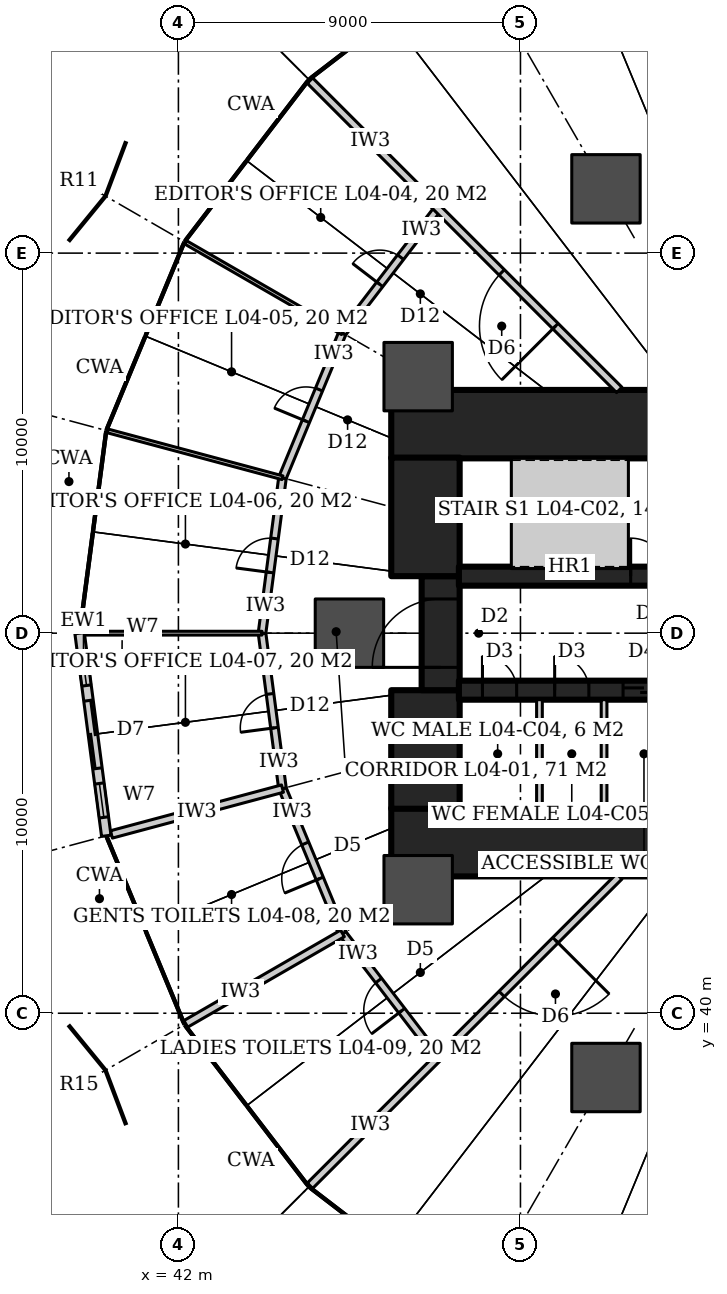
"""IFC4 building model, lengths in metres.
Left out: names, types, materials, properties, quantities, classifications, styles, units other than length and angle.
Written with IfcOpenShell. Run it as: python <this file> out.ifc"""

import sys

from ifc_helpers import new_model, si_unit, direction, frame, frame_2d, origin, origin_2d, place, context, subcontext, project, spatial, rectangle, hollow_circle, extrude, element, fill, save


model = new_model("IFC4")
c1 = context("Model", 3, precision=1e-05, world=origin(), true_north=direction((0.0, 1.0)))
c2 = subcontext(c1, "Body", "Model", "MODEL_VIEW")
j1 = project(units=[si_unit("LENGTHUNIT", "METRE"), si_unit("PLANEANGLEUNIT", "RADIAN")], contexts=[c1])
p1 = place(None, origin())
s1 = spatial("IfcSite", under=j1, at=p1, CompositionType="ELEMENT")
p2 = place(p1, origin())
s2 = spatial("IfcBuilding", under=s1, at=p2, CompositionType="ELEMENT")
p3 = place(p2, frame((0.0, 0.0, 26.0)))
s3 = spatial("IfcBuildingStorey", under=s2, at=p3, CompositionType="ELEMENT", Elevation=26.0)
for number, where, z_axis, x_axis in (
    (1, (47.6, 55.5, 0.0), (0.0, 0.0, 1.0), (1.0, 0.0, 0.0)),
    (2, (47.6, 44.5, 0.0), (0.0, 0.0, 1.0), (1.0, 0.0, 0.0)),
):
    element("IfcWall", number, at=place(p3, frame(where, z_axis=z_axis, x_axis=x_axis)), inside=s3, PredefinedType="SHEAR", context=c2, shape_type="SweptSolid", body=[
        extrude(rectangle(XDim=7.8, YDim=1.8, at=frame_2d((3.9, 0.0))), origin(), (0.0, 0.0, 1.0), 4.2),
    ])
p4 = place(p3, frame((48.5, 45.38, 0.0), z_axis=(0.0, 0.0, 1.0), x_axis=(0.0, 1.0, 0.0)))
e3 = element("IfcWall", 3, at=p4, inside=s3, PredefinedType="SHEAR", context=c2, shape_type="SweptSolid", body=[
    extrude(rectangle(XDim=3.12, YDim=1.8, at=frame_2d((1.56, 0.0))), origin(), (0.0, 0.0, 1.0), 4.2),
])
p5 = place(p3, frame((48.9, 48.5, 0.0), z_axis=(0.0, 0.0, 1.0), x_axis=(0.0, 1.0, 0.0)))
e4 = element("IfcWall", 4, at=p5, inside=s3, PredefinedType="SHEAR", context=c2, shape_type="SweptSolid", body=[
    extrude(rectangle(XDim=3.0, YDim=1.0, at=frame_2d((1.5, 0.0))), origin(), (0.0, 0.0, 1.0), 4.2),
])
p6 = place(p5, frame((0.6, 0.0, 0.0)))
e5 = element("IfcOpeningElement", 5, at=p6, cuts=e4, PredefinedType="OPENING", context=c2, shape_type="SweptSolid", body=[
    extrude(rectangle(XDim=1.8, YDim=2.1, at=frame_2d((0.9, 1.05))), frame((0.0, 0.51, 0.0), z_axis=(0.0, -1.0, 0.0), x_axis=(1.0, 0.0, 0.0)), (0.0, 0.0, 1.0), 1.02),
])
p7 = place(p3, frame((48.5, 51.5, 0.0), z_axis=(0.0, 0.0, 1.0), x_axis=(0.0, 1.0, 0.0)))
e6 = element("IfcWall", 6, at=p7, inside=s3, PredefinedType="SHEAR", context=c2, shape_type="SweptSolid", body=[
    extrude(rectangle(XDim=3.12, YDim=1.8, at=frame_2d((1.56, 0.0))), origin(), (0.0, 0.0, 1.0), 4.2),
])
p8 = place(p3, frame((49.38, 51.5, 0.0), z_axis=(0.0, 0.0, 1.0), x_axis=(1.0, 0.0, 0.0)))
e7 = element("IfcWall", 7, at=p8, inside=s3, PredefinedType="SHEAR", context=c2, shape_type="SweptSolid", body=[
    extrude(rectangle(XDim=6.02, YDim=0.5, at=frame_2d((3.01, 0.0))), origin(), (0.0, 0.0, 1.0), 4.2),
])
p9 = place(p8, frame((4.52, 0.0, 0.0)))
e8 = element("IfcOpeningElement", 8, at=p9, cuts=e7, PredefinedType="OPENING", context=c2, shape_type="SweptSolid", body=[
    extrude(rectangle(XDim=1.0, YDim=2.1, at=frame_2d((0.5, 1.05))), frame((0.0, 0.26, 0.0), z_axis=(0.0, -1.0, 0.0), x_axis=(1.0, 0.0, 0.0)), (0.0, 0.0, 1.0), 0.52),
])
p10 = place(p3, frame((49.38, 48.5, 0.0), z_axis=(0.0, 0.0, 1.0), x_axis=(1.0, 0.0, 0.0)))
e9 = element("IfcWall", 9, at=p10, inside=s3, PredefinedType="SHEAR", context=c2, shape_type="SweptSolid", body=[
    extrude(rectangle(XDim=6.02, YDim=0.5, at=frame_2d((3.01, 0.0))), origin(), (0.0, 0.0, 1.0), 4.2),
])
p11 = place(p10, frame((0.62, 0.0, 0.0)))
e10 = element("IfcOpeningElement", 10, at=p11, cuts=e9, PredefinedType="OPENING", context=c2, shape_type="SweptSolid", body=[
    extrude(rectangle(XDim=0.9, YDim=2.1, at=frame_2d((0.45, 1.05))), frame((0.0, 0.26, 0.0), z_axis=(0.0, -1.0, 0.0), x_axis=(1.0, 0.0, 0.0)), (0.0, 0.0, 1.0), 0.52),
])
p12 = place(p10, frame((2.52, 0.0, 0.0)))
e11 = element("IfcOpeningElement", 11, at=p12, cuts=e9, PredefinedType="OPENING", context=c2, shape_type="SweptSolid", body=[
    extrude(rectangle(XDim=0.9, YDim=2.1, at=frame_2d((0.45, 1.05))), frame((0.0, 0.26, 0.0), z_axis=(0.0, -1.0, 0.0), x_axis=(1.0, 0.0, 0.0)), (0.0, 0.0, 1.0), 0.52),
])
p13 = place(p10, frame((4.32, 0.0, 0.0)))
e12 = element("IfcOpeningElement", 12, at=p13, cuts=e9, PredefinedType="OPENING", context=c2, shape_type="SweptSolid", body=[
    extrude(rectangle(XDim=1.0, YDim=2.1, at=frame_2d((0.5, 1.05))), frame((0.0, 0.26, 0.0), z_axis=(0.0, -1.0, 0.0), x_axis=(1.0, 0.0, 0.0)), (0.0, 0.0, 1.0), 0.52),
])
for number, where, z_axis, x_axis in (
    (13, (53.25, 61.691, -0.16), (0.0, 0.0, 1.0), (1.0, 0.0, 0.0)),
    (14, (48.309, 56.75, -0.16), (0.0, 0.0, 1.0), (1.0, 0.0, 0.0)),
    (15, (46.5, 50.0, -0.16), (0.0, 0.0, 1.0), (1.0, 0.0, 0.0)),
    (16, (48.309, 43.25, -0.16), (0.0, 0.0, 1.0), (1.0, 0.0, 0.0)),
    (17, (53.25, 38.309, -0.16), (0.0, 0.0, 1.0), (1.0, 0.0, 0.0)),
):
    element("IfcColumn", number, at=place(p3, frame(where, z_axis=z_axis, x_axis=x_axis)), inside=s3, PredefinedType="COLUMN", context=c2, shape_type="SweptSolid", body=[
        extrude(hollow_circle(Radius=0.9, WallThickness=0.09, at=origin_2d()), origin(), (0.0, 0.0, 1.0), 4.36),
    ])
p14 = place(p3, frame((48.828, 38.828, 0.0), z_axis=(0.0, 0.0, 1.0), x_axis=(-0.608714823874, 0.793389099494, 0.0)))
e18 = element("IfcWall", 18, at=p14, inside=s3, PredefinedType="PARTITIONING", context=c2, shape_type="SweptSolid", body=[
    extrude(rectangle(XDim=4.125, YDim=0.2, at=frame_2d((2.062, 0.0))), origin(), (0.0, 0.0, 1.0), 3.04),
])
p15 = place(p14, frame((1.562, 0.0, 0.0)))
e19 = element("IfcOpeningElement", 19, at=p15, cuts=e18, PredefinedType="OPENING", context=c2, shape_type="SweptSolid", body=[
    extrude(rectangle(XDim=1.0, YDim=2.1, at=frame_2d((0.5, 1.05))), frame((0.0, 0.11, 0.0), z_axis=(0.0, -1.0, 0.0), x_axis=(1.0, 0.0, 0.0)), (0.0, 0.0, 1.0), 0.22),
])
p16 = place(p3, frame((46.317, 42.1, 0.0), z_axis=(0.0, 0.0, 1.0), x_axis=(-0.382731667114, 0.923859551549, 0.0)))
e20 = element("IfcWall", 20, at=p16, inside=s3, PredefinedType="PARTITIONING", context=c2, shape_type="SweptSolid", body=[
    extrude(rectangle(XDim=4.125, YDim=0.2, at=frame_2d((2.062, 0.0))), origin(), (0.0, 0.0, 1.0), 3.04),
])
p17 = place(p16, frame((1.562, 0.0, 0.0)))
e21 = element("IfcOpeningElement", 21, at=p17, cuts=e20, PredefinedType="OPENING", context=c2, shape_type="SweptSolid", body=[
    extrude(rectangle(XDim=1.0, YDim=2.1, at=frame_2d((0.5, 1.05))), frame((0.0, 0.11, 0.0), z_axis=(0.0, -1.0, 0.0), x_axis=(1.0, 0.0, 0.0)), (0.0, 0.0, 1.0), 0.22),
])
p18 = place(p3, frame((44.738, 45.911, 0.0), z_axis=(0.0, 0.0, 1.0), x_axis=(-0.130515758099, 0.991446234996, 0.0)))
e22 = element("IfcWall", 22, at=p18, inside=s3, PredefinedType="PARTITIONING", context=c2, shape_type="SweptSolid", body=[
    extrude(rectangle(XDim=4.125, YDim=0.2, at=frame_2d((2.062, 0.0))), origin(), (0.0, 0.0, 1.0), 3.04),
])
p19 = place(p18, frame((1.612, 0.0, 0.0)))
e23 = element("IfcOpeningElement", 23, at=p19, cuts=e22, PredefinedType="OPENING", context=c2, shape_type="SweptSolid", body=[
    extrude(rectangle(XDim=0.9, YDim=2.4, at=frame_2d((0.45, 1.2))), frame((0.0, 0.11, 0.0), z_axis=(0.0, -1.0, 0.0), x_axis=(1.0, 0.0, 0.0)), (0.0, 0.0, 1.0), 0.22),
])
p20 = place(p3, frame((44.2, 50.0, 0.0), z_axis=(0.0, 0.0, 1.0), x_axis=(0.130515758099, 0.991446234996, 0.0)))
e24 = element("IfcWall", 24, at=p20, inside=s3, PredefinedType="PARTITIONING", context=c2, shape_type="SweptSolid", body=[
    extrude(rectangle(XDim=4.125, YDim=0.2, at=frame_2d((2.062, 0.0))), origin(), (0.0, 0.0, 1.0), 3.04),
])
p21 = place(p20, frame((1.612, 0.0, 0.0)))
e25 = element("IfcOpeningElement", 25, at=p21, cuts=e24, PredefinedType="OPENING", context=c2, shape_type="SweptSolid", body=[
    extrude(rectangle(XDim=0.9, YDim=2.4, at=frame_2d((0.45, 1.2))), frame((0.0, 0.11, 0.0), z_axis=(0.0, -1.0, 0.0), x_axis=(1.0, 0.0, 0.0)), (0.0, 0.0, 1.0), 0.22),
])
p22 = place(p3, frame((44.738, 54.089, 0.0), z_axis=(0.0, 0.0, 1.0), x_axis=(0.382731667114, 0.923859551549, 0.0)))
e26 = element("IfcWall", 26, at=p22, inside=s3, PredefinedType="PARTITIONING", context=c2, shape_type="SweptSolid", body=[
    extrude(rectangle(XDim=4.125, YDim=0.2, at=frame_2d((2.062, 0.0))), origin(), (0.0, 0.0, 1.0), 3.04),
])
p23 = place(p22, frame((1.612, 0.0, 0.0)))
e27 = element("IfcOpeningElement", 27, at=p23, cuts=e26, PredefinedType="OPENING", context=c2, shape_type="SweptSolid", body=[
    extrude(rectangle(XDim=0.9, YDim=2.4, at=frame_2d((0.45, 1.2))), frame((0.0, 0.11, 0.0), z_axis=(0.0, -1.0, 0.0), x_axis=(1.0, 0.0, 0.0)), (0.0, 0.0, 1.0), 0.22),
])
p24 = place(p3, frame((46.317, 57.9, 0.0), z_axis=(0.0, 0.0, 1.0), x_axis=(0.608714823874, 0.793389099494, 0.0)))
e28 = element("IfcWall", 28, at=p24, inside=s3, PredefinedType="PARTITIONING", context=c2, shape_type="SweptSolid", body=[
    extrude(rectangle(XDim=4.125, YDim=0.2, at=frame_2d((2.062, 0.0))), origin(), (0.0, 0.0, 1.0), 3.04),
])
p25 = place(p24, frame((1.612, 0.0, 0.0)))
e29 = element("IfcOpeningElement", 29, at=p25, cuts=e28, PredefinedType="OPENING", context=c2, shape_type="SweptSolid", body=[
    extrude(rectangle(XDim=0.9, YDim=2.4, at=frame_2d((0.45, 1.2))), frame((0.0, 0.11, 0.0), z_axis=(0.0, -1.0, 0.0), x_axis=(1.0, 0.0, 0.0)), (0.0, 0.0, 1.0), 0.22),
])
p26 = place(p3, frame((53.6, 56.4, 0.0), z_axis=(0.0, 0.0, 1.0), x_axis=(-0.707106781187, 0.707106781187, 0.0)))
e30 = element("IfcWall", 30, at=p26, inside=s3, PredefinedType="PARTITIONING", context=c2, shape_type="SweptSolid", body=[
    extrude(rectangle(XDim=11.509, YDim=0.2, at=frame_2d((5.754, 0.0))), origin(), (0.0, 0.0, 1.0), 3.02),
])
p27 = place(p26, frame((2.375, 0.0, 0.0)))
e31 = element("IfcOpeningElement", 31, at=p27, cuts=e30, PredefinedType="OPENING", context=c2, shape_type="SweptSolid", body=[
    extrude(rectangle(XDim=2.0, YDim=2.1, at=frame_2d((1.0, 1.05))), frame((0.0, 0.11, 0.0), z_axis=(0.0, -1.0, 0.0), x_axis=(1.0, 0.0, 0.0)), (0.0, 0.0, 1.0), 0.22),
])
p28 = place(p3, frame((46.317, 57.9, 0.0), z_axis=(0.0, 0.0, 1.0), x_axis=(-0.866015616091, 0.5000169524, 0.0)))
e32 = element("IfcWall", 32, at=p28, inside=s3, PredefinedType="PARTITIONING", context=c2, shape_type="SweptSolid", body=[
    extrude(rectangle(XDim=4.76, YDim=0.1, at=frame_2d((2.38, 0.0))), origin(), (0.0, 0.0, 1.0), 3.04),
])
p29 = place(p3, frame((44.738, 54.089, 0.0), z_axis=(0.0, 0.0, 1.0), x_axis=(-0.965926072385, 0.25881812666, 0.0)))
e33 = element("IfcWall", 33, at=p29, inside=s3, PredefinedType="PARTITIONING", context=c2, shape_type="SweptSolid", body=[
    extrude(rectangle(XDim=4.76, YDim=0.1, at=frame_2d((2.38, 0.0))), origin(), (0.0, 0.0, 1.0), 3.04),
])
p30 = place(p3, frame((44.2, 50.0, 0.0), z_axis=(0.0, 0.0, 1.0), x_axis=(-1.0, 0.0, 0.0)))
e34 = element("IfcWall", 34, at=p30, inside=s3, PredefinedType="PARTITIONING", context=c2, shape_type="SweptSolid", body=[
    extrude(rectangle(XDim=4.66, YDim=0.1, at=frame_2d((2.33, 0.0))), origin(), (0.0, 0.0, 1.0), 3.04),
])
p31 = place(p3, frame((44.738, 45.911, 0.0), z_axis=(0.0, 0.0, 1.0), x_axis=(-0.965924664608, -0.258823380515, 0.0)))
e35 = element("IfcWall", 35, at=p31, inside=s3, PredefinedType="PARTITIONING", context=c2, shape_type="SweptSolid", body=[
    extrude(rectangle(XDim=4.66, YDim=0.2, at=frame_2d((2.33, 0.0))), origin(), (0.0, 0.0, 1.0), 3.04),
])
p32 = place(p3, frame((46.317, 42.1, 0.0), z_axis=(0.0, 0.0, 1.0), x_axis=(-0.866015616091, -0.5000169524, 0.0)))
e36 = element("IfcWall", 36, at=p32, inside=s3, PredefinedType="PARTITIONING", context=c2, shape_type="SweptSolid", body=[
    extrude(rectangle(XDim=4.76, YDim=0.2, at=frame_2d((2.38, 0.0))), origin(), (0.0, 0.0, 1.0), 3.04),
])
p33 = place(p3, frame((53.6, 43.6, 0.0), z_axis=(0.0, 0.0, 1.0), x_axis=(-0.707106781187, -0.707106781187, 0.0)))
e37 = element("IfcWall", 37, at=p33, inside=s3, PredefinedType="PARTITIONING", context=c2, shape_type="SweptSolid", body=[
    extrude(rectangle(XDim=11.509, YDim=0.2, at=frame_2d((5.754, 0.0))), origin(), (0.0, 0.0, 1.0), 3.02),
])
p34 = place(p33, frame((2.375, 0.0, 0.0)))
e38 = element("IfcOpeningElement", 38, at=p34, cuts=e37, PredefinedType="OPENING", context=c2, shape_type="SweptSolid", body=[
    extrude(rectangle(XDim=2.0, YDim=2.1, at=frame_2d((1.0, 1.05))), frame((0.0, 0.11, 0.0), z_axis=(0.0, -1.0, 0.0), x_axis=(1.0, 0.0, 0.0)), (0.0, 0.0, 1.0), 0.22),
])
p35 = place(p3, frame((39.4, 50.0, 0.0), z_axis=(0.0, 0.0, 1.0), x_axis=(0.130519101615, -0.991445794844, 0.0)))
e39 = element("IfcWall", 39, at=p35, inside=s3, PredefinedType="SOLIDWALL", context=c2, shape_type="SweptSolid", body=[
    extrude(rectangle(XDim=5.378, YDim=0.25, at=frame_2d((2.689, 0.0))), origin(), (0.0, 0.0, 1.0), 4.04),
])
p36 = place(p35, frame((1.789, 0.0, 0.0)))
e40 = element("IfcOpeningElement", 40, at=p36, cuts=e39, PredefinedType="OPENING", context=c2, shape_type="SweptSolid", body=[
    extrude(rectangle(XDim=1.8, YDim=2.4, at=frame_2d((0.9, 1.2))), frame((0.0, 0.135, 0.0), z_axis=(0.0, -1.0, 0.0), x_axis=(1.0, 0.0, 0.0)), (0.0, 0.0, 1.0), 0.27),
])
p37 = place(p35, frame((0.489, 0.0, 0.0)))
e41 = element("IfcOpeningElement", 41, at=p37, cuts=e39, PredefinedType="OPENING", context=c2, shape_type="SweptSolid", body=[
    extrude(rectangle(XDim=0.9, YDim=2.4, at=frame_2d((0.45, 1.2))), frame((0.0, 0.135, 0.0), z_axis=(0.0, -1.0, 0.0), x_axis=(1.0, 0.0, 0.0)), (0.0, 0.0, 1.0), 0.27),
])
p38 = place(p35, frame((3.989, 0.0, 0.0)))
e42 = element("IfcOpeningElement", 42, at=p38, cuts=e39, PredefinedType="OPENING", context=c2, shape_type="SweptSolid", body=[
    extrude(rectangle(XDim=0.9, YDim=2.4, at=frame_2d((0.45, 1.2))), frame((0.0, 0.135, 0.0), z_axis=(0.0, -1.0, 0.0), x_axis=(1.0, 0.0, 0.0)), (0.0, 0.0, 1.0), 0.27),
])
for number, where, z_axis, x_axis in (
    (43, (51.5, 45.4, 0.0), (0.0, 0.0, 1.0), (0.0, 1.0, 0.0)),
    (44, (53.2, 45.4, 0.0), (0.0, 0.0, 1.0), (0.0, 1.0, 0.0)),
):
    element("IfcWall", number, at=place(p3, frame(where, z_axis=z_axis, x_axis=x_axis)), inside=s3, PredefinedType="PARTITIONING", context=c2, shape_type="SweptSolid", body=[
        extrude(rectangle(XDim=2.85, YDim=0.15, at=frame_2d((1.425, 0.0))), origin(), (0.0, 0.0, 1.0), 4.04),
    ])
p39 = place(p27, origin())
e45 = element("IfcDoor", 45, at=p39, inside=s3, OperationType="DOUBLE_DOOR_DOUBLE_SWING", PredefinedType="DOOR", context=c2, shape_type="SweptSolid", body=[
    extrude(rectangle(XDim=2.0, YDim=2.1, at=frame_2d((1.0, 1.05))), frame((0.0, 0.025, 0.0), z_axis=(0.0, -1.0, 0.0), x_axis=(1.0, 0.0, 0.0)), (0.0, 0.0, 1.0), 0.05),
])
fill(e31, e45)
p40 = place(p25, origin())
e46 = element("IfcDoor", 46, at=p40, inside=s3, OperationType="SINGLE_SWING_LEFT", PredefinedType="DOOR", context=c2, shape_type="SweptSolid", body=[
    extrude(rectangle(XDim=0.9, YDim=2.4, at=frame_2d((0.45, 1.2))), frame((0.0, 0.025, 0.0), z_axis=(0.0, -1.0, 0.0), x_axis=(1.0, 0.0, 0.0)), (0.0, 0.0, 1.0), 0.05),
])
fill(e29, e46)
p41 = place(p23, origin())
e47 = element("IfcDoor", 47, at=p41, inside=s3, OperationType="SINGLE_SWING_LEFT", PredefinedType="DOOR", context=c2, shape_type="SweptSolid", body=[
    extrude(rectangle(XDim=0.9, YDim=2.4, at=frame_2d((0.45, 1.2))), frame((0.0, 0.025, 0.0), z_axis=(0.0, -1.0, 0.0), x_axis=(1.0, 0.0, 0.0)), (0.0, 0.0, 1.0), 0.05),
])
fill(e27, e47)
p42 = place(p21, origin())
e48 = element("IfcDoor", 48, at=p42, inside=s3, OperationType="SINGLE_SWING_LEFT", PredefinedType="DOOR", context=c2, shape_type="SweptSolid", body=[
    extrude(rectangle(XDim=0.9, YDim=2.4, at=frame_2d((0.45, 1.2))), frame((0.0, 0.025, 0.0), z_axis=(0.0, -1.0, 0.0), x_axis=(1.0, 0.0, 0.0)), (0.0, 0.0, 1.0), 0.05),
])
fill(e25, e48)
p43 = place(p19, origin())
e49 = element("IfcDoor", 49, at=p43, inside=s3, OperationType="SINGLE_SWING_LEFT", PredefinedType="DOOR", context=c2, shape_type="SweptSolid", body=[
    extrude(rectangle(XDim=0.9, YDim=2.4, at=frame_2d((0.45, 1.2))), frame((0.0, 0.025, 0.0), z_axis=(0.0, -1.0, 0.0), x_axis=(1.0, 0.0, 0.0)), (0.0, 0.0, 1.0), 0.05),
])
fill(e23, e49)
p44 = place(p17, origin())
e50 = element("IfcDoor", 50, at=p44, inside=s3, OperationType="SINGLE_SWING_LEFT", PredefinedType="DOOR", context=c2, shape_type="SweptSolid", body=[
    extrude(rectangle(XDim=1.0, YDim=2.1, at=frame_2d((0.5, 1.05))), frame((0.0, 0.025, 0.0), z_axis=(0.0, -1.0, 0.0), x_axis=(1.0, 0.0, 0.0)), (0.0, 0.0, 1.0), 0.05),
])
fill(e21, e50)
p45 = place(p15, origin())
e51 = element("IfcDoor", 51, at=p45, inside=s3, OperationType="SINGLE_SWING_LEFT", PredefinedType="DOOR", context=c2, shape_type="SweptSolid", body=[
    extrude(rectangle(XDim=1.0, YDim=2.1, at=frame_2d((0.5, 1.05))), frame((0.0, 0.025, 0.0), z_axis=(0.0, -1.0, 0.0), x_axis=(1.0, 0.0, 0.0)), (0.0, 0.0, 1.0), 0.05),
])
fill(e19, e51)
p46 = place(p34, origin())
e52 = element("IfcDoor", 52, at=p46, inside=s3, OperationType="DOUBLE_DOOR_DOUBLE_SWING", PredefinedType="DOOR", context=c2, shape_type="SweptSolid", body=[
    extrude(rectangle(XDim=2.0, YDim=2.1, at=frame_2d((1.0, 1.05))), frame((0.0, 0.025, 0.0), z_axis=(0.0, -1.0, 0.0), x_axis=(1.0, 0.0, 0.0)), (0.0, 0.0, 1.0), 0.05),
])
fill(e38, e52)
p47 = place(p36, origin())
e53 = element("IfcDoor", 53, at=p47, inside=s3, OperationType="DOUBLE_DOOR_SLIDING", PredefinedType="DOOR", context=c2, shape_type="SweptSolid", body=[
    extrude(rectangle(XDim=1.8, YDim=2.4, at=frame_2d((0.9, 1.2))), frame((0.0, 0.025, 0.0), z_axis=(0.0, -1.0, 0.0), x_axis=(1.0, 0.0, 0.0)), (0.0, 0.0, 1.0), 0.05),
])
fill(e40, e53)
p48 = place(p37, origin())
e54 = element("IfcWindow", 54, at=p48, inside=s3, PartitioningType="SINGLE_PANEL", PredefinedType="WINDOW", context=c2, shape_type="SweptSolid", body=[
    extrude(rectangle(XDim=0.9, YDim=2.4, at=frame_2d((0.45, 1.2))), frame((0.0, 0.03, 0.0), z_axis=(0.0, -1.0, 0.0), x_axis=(1.0, 0.0, 0.0)), (0.0, 0.0, 1.0), 0.06),
])
fill(e41, e54)
p49 = place(p38, origin())
e55 = element("IfcWindow", 55, at=p49, inside=s3, PartitioningType="SINGLE_PANEL", PredefinedType="WINDOW", context=c2, shape_type="SweptSolid", body=[
    extrude(rectangle(XDim=0.9, YDim=2.4, at=frame_2d((0.45, 1.2))), frame((0.0, 0.03, 0.0), z_axis=(0.0, -1.0, 0.0), x_axis=(1.0, 0.0, 0.0)), (0.0, 0.0, 1.0), 0.06),
])
fill(e42, e55)
p50 = place(p9, origin())
e56 = element("IfcDoor", 56, at=p50, inside=s3, OperationType="SINGLE_SWING_LEFT", PredefinedType="DOOR", context=c2, shape_type="SweptSolid", body=[
    extrude(rectangle(XDim=1.0, YDim=2.1, at=frame_2d((0.5, 1.05))), frame((0.0, 0.025, 0.0), z_axis=(0.0, -1.0, 0.0), x_axis=(1.0, 0.0, 0.0)), (0.0, 0.0, 1.0), 0.05),
])
fill(e8, e56)
p51 = place(p11, origin())
e57 = element("IfcDoor", 57, at=p51, inside=s3, OperationType="SINGLE_SWING_RIGHT", PredefinedType="DOOR", context=c2, shape_type="SweptSolid", body=[
    extrude(rectangle(XDim=0.9, YDim=2.1, at=frame_2d((0.45, 1.05))), frame((0.0, 0.025, 0.0), z_axis=(0.0, -1.0, 0.0), x_axis=(1.0, 0.0, 0.0)), (0.0, 0.0, 1.0), 0.05),
])
fill(e10, e57)
p52 = place(p12, origin())
e58 = element("IfcDoor", 58, at=p52, inside=s3, OperationType="SINGLE_SWING_RIGHT", PredefinedType="DOOR", context=c2, shape_type="SweptSolid", body=[
    extrude(rectangle(XDim=0.9, YDim=2.1, at=frame_2d((0.45, 1.05))), frame((0.0, 0.025, 0.0), z_axis=(0.0, -1.0, 0.0), x_axis=(1.0, 0.0, 0.0)), (0.0, 0.0, 1.0), 0.05),
])
fill(e11, e58)
p53 = place(p13, origin())
e59 = element("IfcDoor", 59, at=p53, inside=s3, OperationType="SLIDING_TO_LEFT", PredefinedType="DOOR", context=c2, shape_type="SweptSolid", body=[
    extrude(rectangle(XDim=1.0, YDim=2.1, at=frame_2d((0.5, 1.05))), frame((0.0, 0.025, 0.0), z_axis=(0.0, -1.0, 0.0), x_axis=(1.0, 0.0, 0.0)), (0.0, 0.0, 1.0), 0.05),
])
fill(e12, e59)
p54 = place(p6, origin())
e60 = element("IfcDoor", 60, at=p54, inside=s3, OperationType="DOUBLE_DOOR_DOUBLE_SWING", PredefinedType="DOOR", context=c2, shape_type="SweptSolid", body=[
    extrude(rectangle(XDim=1.8, YDim=2.1, at=frame_2d((0.9, 1.05))), frame((0.0, 0.025, 0.0), z_axis=(0.0, -1.0, 0.0), x_axis=(1.0, 0.0, 0.0)), (0.0, 0.0, 1.0), 0.05),
])
fill(e5, e60)
save(model, sys.argv[1])
